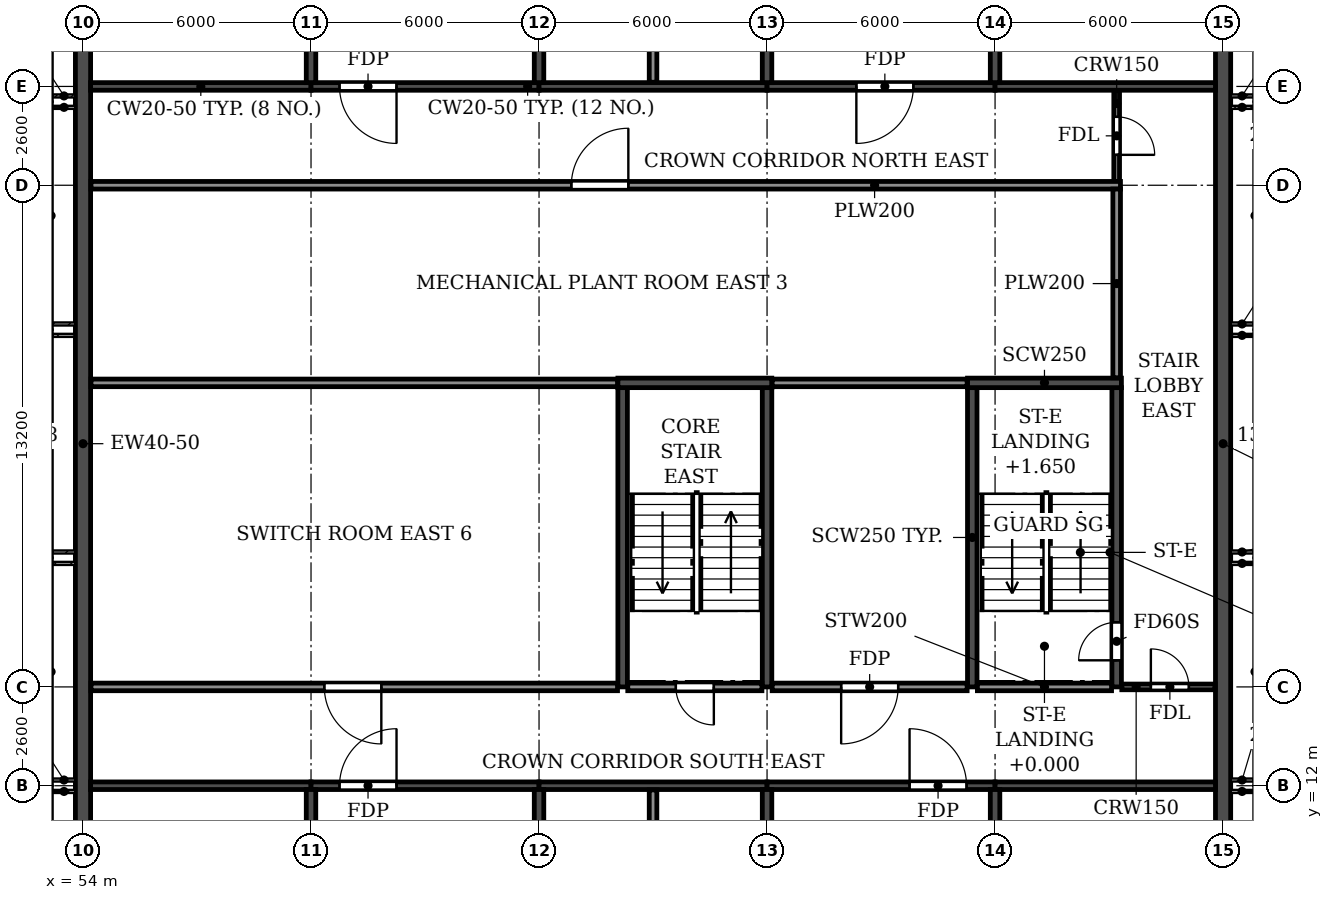
"""IFC4 building model, lengths in metres.
Left out: names, types, materials, properties, quantities, classifications, styles, units other than length and angle.
Written with IfcOpenShell. Run it as: python <this file> out.ifc"""

import sys

from ifc_helpers import new_model, si_unit, direction, frame, frame_2d, origin, place, context, subcontext, project, spatial, rectangle, extrude, element, fill, save


model = new_model("IFC4")
c1 = context("Model", 3, precision=1e-05, world=origin(), true_north=direction((0.0, 1.0)))
c2 = subcontext(c1, "Body", "Model", "MODEL_VIEW")
j1 = project(units=[si_unit("LENGTHUNIT", "METRE"), si_unit("PLANEANGLEUNIT", "RADIAN")], contexts=[c1])
p1 = place(None, origin())
s1 = spatial("IfcSite", under=j1, at=p1, CompositionType="ELEMENT")
p2 = place(p1, origin())
s2 = spatial("IfcBuilding", under=s1, at=p2, CompositionType="ELEMENT")
p3 = place(p2, frame((0.0, 0.0, 279.0)))
s3 = spatial("IfcBuildingStorey", under=s2, at=p3, CompositionType="ELEMENT", Elevation=279.0)
p4 = place(p3, frame((60.0, 0.2, 0.0), z_axis=(0.0, 0.0, 1.0), x_axis=(0.0, 1.0, 0.0)))
e1 = element("IfcWall", 1, at=p4, inside=s3, PredefinedType="SHEAR", context=c2, shape_type="SweptSolid", body=[
    extrude(rectangle(XDim=11.7, YDim=0.25, at=frame_2d((5.85, 0.0))), origin(), (0.0, 0.0, 1.0), 3.05),
])
p5 = place(p3, frame((60.0, 30.5, 0.0), z_axis=(0.0, 0.0, 1.0), x_axis=(0.0, 1.0, 0.0)))
e2 = element("IfcWall", 2, at=p5, inside=s3, PredefinedType="SHEAR", context=c2, shape_type="SweptSolid", body=[
    extrude(rectangle(XDim=10.5, YDim=0.25, at=frame_2d((5.25, 0.0))), origin(), (0.0, 0.0, 1.0), 3.05),
])
p6 = place(p3, frame((66.0, 0.2, 0.0), z_axis=(0.0, 0.0, 1.0), x_axis=(0.0, 1.0, 0.0)))
e3 = element("IfcWall", 3, at=p6, inside=s3, PredefinedType="SHEAR", context=c2, shape_type="SweptSolid", body=[
    extrude(rectangle(XDim=11.7, YDim=0.25, at=frame_2d((5.85, 0.0))), origin(), (0.0, 0.0, 1.0), 3.05),
])
p7 = place(p3, frame((66.0, 30.5, 0.0), z_axis=(0.0, 0.0, 1.0), x_axis=(0.0, 1.0, 0.0)))
e4 = element("IfcWall", 4, at=p7, inside=s3, PredefinedType="SHEAR", context=c2, shape_type="SweptSolid", body=[
    extrude(rectangle(XDim=10.5, YDim=0.25, at=frame_2d((5.25, 0.0))), origin(), (0.0, 0.0, 1.0), 3.05),
])
p8 = place(p3, frame((72.0, 0.2, 0.0), z_axis=(0.0, 0.0, 1.0), x_axis=(0.0, 1.0, 0.0)))
e5 = element("IfcWall", 5, at=p8, inside=s3, PredefinedType="SHEAR", context=c2, shape_type="SweptSolid", body=[
    extrude(rectangle(XDim=11.7, YDim=0.25, at=frame_2d((5.85, 0.0))), origin(), (0.0, 0.0, 1.0), 3.05),
])
p9 = place(p3, frame((72.0, 30.5, 0.0), z_axis=(0.0, 0.0, 1.0), x_axis=(0.0, 1.0, 0.0)))
e6 = element("IfcWall", 6, at=p9, inside=s3, PredefinedType="SHEAR", context=c2, shape_type="SweptSolid", body=[
    extrude(rectangle(XDim=10.5, YDim=0.25, at=frame_2d((5.25, 0.0))), origin(), (0.0, 0.0, 1.0), 3.05),
])
p10 = place(p3, frame((78.0, 0.2, 0.0), z_axis=(0.0, 0.0, 1.0), x_axis=(0.0, 1.0, 0.0)))
e7 = element("IfcWall", 7, at=p10, inside=s3, PredefinedType="SHEAR", context=c2, shape_type="SweptSolid", body=[
    extrude(rectangle(XDim=11.7, YDim=0.25, at=frame_2d((5.85, 0.0))), origin(), (0.0, 0.0, 1.0), 3.05),
])
p11 = place(p3, frame((78.0, 30.5, 0.0), z_axis=(0.0, 0.0, 1.0), x_axis=(0.0, 1.0, 0.0)))
e8 = element("IfcWall", 8, at=p11, inside=s3, PredefinedType="SHEAR", context=c2, shape_type="SweptSolid", body=[
    extrude(rectangle(XDim=10.5, YDim=0.25, at=frame_2d((5.25, 0.0))), origin(), (0.0, 0.0, 1.0), 3.05),
])
p12 = place(p3, frame((54.0, 0.2, 0.0), z_axis=(0.0, 0.0, 1.0), x_axis=(0.0, 1.0, 0.0)))
e9 = element("IfcWall", 9, at=p12, inside=s3, PredefinedType="SHEAR", context=c2, shape_type="SweptSolid", body=[
    extrude(rectangle(XDim=40.8, YDim=0.4, at=frame_2d((20.4, 0.0))), origin(), (0.0, 0.0, 1.0), 3.05),
])
p13 = place(p3, frame((84.0, 4.683, 0.0), z_axis=(0.0, 0.0, 1.0), x_axis=(0.0, 1.0, 0.0)))
e10 = element("IfcWall", 10, at=p13, inside=s3, PredefinedType="SHEAR", context=c2, shape_type="SweptSolid", body=[
    extrude(rectangle(XDim=31.834, YDim=0.4, at=frame_2d((15.917, 0.0))), origin(), (0.0, 0.0, 1.0), 3.05),
])
p14 = place(p3, frame((54.2, 12.0, 0.0), z_axis=(0.0, 0.0, 1.0), x_axis=(1.0, 0.0, 0.0)))
e11 = element("IfcWall", 11, at=p14, inside=s3, PredefinedType="SHEAR", context=c2, shape_type="SweptSolid", body=[
    extrude(rectangle(XDim=5.8, YDim=0.2, at=frame_2d((2.9, 0.0))), origin(), (0.0, 0.0, 1.0), 2.45),
])
p15 = place(p3, frame((60.0, 12.0, 0.0), z_axis=(0.0, 0.0, 1.0), x_axis=(1.0, 0.0, 0.0)))
e12 = element("IfcWall", 12, at=p15, inside=s3, PredefinedType="SHEAR", context=c2, shape_type="SweptSolid", body=[
    extrude(rectangle(XDim=6.0, YDim=0.2, at=frame_2d((3.0, 0.0))), origin(), (0.0, 0.0, 1.0), 2.45),
])
p16 = place(p15, frame((0.75, 0.0, 0.0)))
e13 = element("IfcOpeningElement", 13, at=p16, cuts=e12, PredefinedType="OPENING", context=c2, shape_type="SweptSolid", body=[
    extrude(rectangle(XDim=1.5, YDim=2.1, at=frame_2d((0.75, 1.05))), frame((0.0, 0.11, 0.0), z_axis=(0.0, -1.0, 0.0), x_axis=(1.0, 0.0, 0.0)), (0.0, 0.0, 1.0), 0.22),
])
p17 = place(p3, frame((66.0, 12.0, 0.0), z_axis=(0.0, 0.0, 1.0), x_axis=(1.0, 0.0, 0.0)))
e14 = element("IfcWall", 14, at=p17, inside=s3, PredefinedType="SHEAR", context=c2, shape_type="SweptSolid", body=[
    extrude(rectangle(XDim=6.0, YDim=0.2, at=frame_2d((3.0, 0.0))), origin(), (0.0, 0.0, 1.0), 2.45),
])
p18 = place(p3, frame((72.0, 12.0, 0.0), z_axis=(0.0, 0.0, 1.0), x_axis=(1.0, 0.0, 0.0)))
e15 = element("IfcWall", 15, at=p18, inside=s3, PredefinedType="SHEAR", context=c2, shape_type="SweptSolid", body=[
    extrude(rectangle(XDim=6.0, YDim=0.2, at=frame_2d((3.0, 0.0))), origin(), (0.0, 0.0, 1.0), 2.45),
])
p19 = place(p18, frame((3.75, 0.0, 0.0)))
e16 = element("IfcOpeningElement", 16, at=p19, cuts=e15, PredefinedType="OPENING", context=c2, shape_type="SweptSolid", body=[
    extrude(rectangle(XDim=1.5, YDim=2.1, at=frame_2d((0.75, 1.05))), frame((0.0, 0.11, 0.0), z_axis=(0.0, -1.0, 0.0), x_axis=(1.0, 0.0, 0.0)), (0.0, 0.0, 1.0), 0.22),
])
for number, where, z_axis, x_axis in (
    (17, (78.0, 12.0, 0.0), (0.0, 0.0, 1.0), (1.0, 0.0, 0.0)),
    (18, (54.2, 30.4, 0.0), (0.0, 0.0, 1.0), (1.0, 0.0, 0.0)),
):
    element("IfcWall", number, at=place(p3, frame(where, z_axis=z_axis, x_axis=x_axis)), inside=s3, PredefinedType="SHEAR", context=c2, shape_type="SweptSolid", body=[
        extrude(rectangle(XDim=5.8, YDim=0.2, at=frame_2d((2.9, 0.0))), origin(), (0.0, 0.0, 1.0), 2.45),
    ])
p20 = place(p3, frame((60.0, 30.4, 0.0), z_axis=(0.0, 0.0, 1.0), x_axis=(1.0, 0.0, 0.0)))
e19 = element("IfcWall", 19, at=p20, inside=s3, PredefinedType="SHEAR", context=c2, shape_type="SweptSolid", body=[
    extrude(rectangle(XDim=6.0, YDim=0.2, at=frame_2d((3.0, 0.0))), origin(), (0.0, 0.0, 1.0), 2.45),
])
p21 = place(p20, frame((0.75, 0.0, 0.0)))
e20 = element("IfcOpeningElement", 20, at=p21, cuts=e19, PredefinedType="OPENING", context=c2, shape_type="SweptSolid", body=[
    extrude(rectangle(XDim=1.5, YDim=2.1, at=frame_2d((0.75, 1.05))), frame((0.0, 0.11, 0.0), z_axis=(0.0, -1.0, 0.0), x_axis=(1.0, 0.0, 0.0)), (0.0, 0.0, 1.0), 0.22),
])
p22 = place(p3, frame((66.0, 30.4, 0.0), z_axis=(0.0, 0.0, 1.0), x_axis=(1.0, 0.0, 0.0)))
e21 = element("IfcWall", 21, at=p22, inside=s3, PredefinedType="SHEAR", context=c2, shape_type="SweptSolid", body=[
    extrude(rectangle(XDim=6.0, YDim=0.2, at=frame_2d((3.0, 0.0))), origin(), (0.0, 0.0, 1.0), 2.45),
])
p23 = place(p3, frame((72.0, 30.4, 0.0), z_axis=(0.0, 0.0, 1.0), x_axis=(1.0, 0.0, 0.0)))
e22 = element("IfcWall", 22, at=p23, inside=s3, PredefinedType="SHEAR", context=c2, shape_type="SweptSolid", body=[
    extrude(rectangle(XDim=6.0, YDim=0.2, at=frame_2d((3.0, 0.0))), origin(), (0.0, 0.0, 1.0), 2.45),
])
p24 = place(p23, frame((2.35, 0.0, 0.0)))
e23 = element("IfcOpeningElement", 23, at=p24, cuts=e22, PredefinedType="OPENING", context=c2, shape_type="SweptSolid", body=[
    extrude(rectangle(XDim=1.5, YDim=2.1, at=frame_2d((0.75, 1.05))), frame((0.0, 0.11, 0.0), z_axis=(0.0, -1.0, 0.0), x_axis=(1.0, 0.0, 0.0)), (0.0, 0.0, 1.0), 0.22),
])
p25 = place(p3, frame((78.0, 30.4, 0.0), z_axis=(0.0, 0.0, 1.0), x_axis=(1.0, 0.0, 0.0)))
e24 = element("IfcWall", 24, at=p25, inside=s3, PredefinedType="SHEAR", context=c2, shape_type="SweptSolid", body=[
    extrude(rectangle(XDim=5.8, YDim=0.2, at=frame_2d((2.9, 0.0))), origin(), (0.0, 0.0, 1.0), 2.45),
])
p26 = place(p3, frame((77.4, 14.6, 0.0), z_axis=(0.0, 0.0, 1.0), x_axis=(0.0, 1.0, 0.0)))
e25 = element("IfcWall", 25, at=p26, inside=s3, PredefinedType="SOLIDWALL", context=c2, shape_type="SweptSolid", body=[
    extrude(rectangle(XDim=7.875, YDim=0.25, at=frame_2d((3.938, 0.0))), origin(), (0.0, 0.0, 1.0), 3.05),
])
p27 = place(p3, frame((81.2, 14.6, 0.0), z_axis=(0.0, 0.0, 1.0), x_axis=(0.0, 1.0, 0.0)))
e26 = element("IfcWall", 26, at=p27, inside=s3, PredefinedType="SOLIDWALL", context=c2, shape_type="SweptSolid", body=[
    extrude(rectangle(XDim=7.875, YDim=0.25, at=frame_2d((3.938, 0.0))), origin(), (0.0, 0.0, 1.0), 3.05),
])
p28 = place(p27, frame((0.7, 0.0, 0.0)))
e27 = element("IfcOpeningElement", 27, at=p28, cuts=e26, PredefinedType="OPENING", context=c2, shape_type="SweptSolid", body=[
    extrude(rectangle(XDim=1.0, YDim=2.1, at=frame_2d((0.5, 1.05))), frame((0.0, 0.135, 0.0), z_axis=(0.0, -1.0, 0.0), x_axis=(1.0, 0.0, 0.0)), (0.0, 0.0, 1.0), 0.27),
])
p29 = place(p3, frame((77.275, 22.6, 0.0), z_axis=(0.0, 0.0, 1.0), x_axis=(1.0, 0.0, 0.0)))
e28 = element("IfcWall", 28, at=p29, inside=s3, PredefinedType="SOLIDWALL", context=c2, shape_type="SweptSolid", body=[
    extrude(rectangle(XDim=4.05, YDim=0.25, at=frame_2d((2.025, 0.0))), origin(), (0.0, 0.0, 1.0), 3.05),
])
for number, where, z_axis, x_axis in (
    (29, (68.2, 14.6, 0.0), (0.0, 0.0, 1.0), (0.0, 1.0, 0.0)),
    (30, (72.0, 14.6, 0.0), (0.0, 0.0, 1.0), (0.0, 1.0, 0.0)),
):
    element("IfcWall", number, at=place(p3, frame(where, z_axis=z_axis, x_axis=x_axis)), inside=s3, PredefinedType="SOLIDWALL", context=c2, shape_type="SweptSolid", body=[
        extrude(rectangle(XDim=7.875, YDim=0.25, at=frame_2d((3.938, 0.0))), origin(), (0.0, 0.0, 1.0), 3.05),
    ])
p30 = place(p3, frame((68.075, 22.6, 0.0), z_axis=(0.0, 0.0, 1.0), x_axis=(1.0, 0.0, 0.0)))
e31 = element("IfcWall", 31, at=p30, inside=s3, PredefinedType="SOLIDWALL", context=c2, shape_type="SweptSolid", body=[
    extrude(rectangle(XDim=4.05, YDim=0.25, at=frame_2d((2.025, 0.0))), origin(), (0.0, 0.0, 1.0), 3.05),
])
p31 = place(p3, frame((81.335, 14.6, 0.0), z_axis=(0.0, 0.0, 1.0), x_axis=(1.0, 0.0, 0.0)))
e32 = element("IfcWall", 32, at=p31, inside=s3, PredefinedType="PARTITIONING", context=c2, shape_type="SweptSolid", body=[
    extrude(rectangle(XDim=2.455, YDim=0.15, at=frame_2d((1.228, 0.0))), origin(), (0.0, 0.0, 1.0), 3.05),
])
p32 = place(p31, frame((0.765, 0.0, 0.0)))
e33 = element("IfcOpeningElement", 33, at=p32, cuts=e32, PredefinedType="OPENING", context=c2, shape_type="SweptSolid", body=[
    extrude(rectangle(XDim=1.0, YDim=2.1, at=frame_2d((0.5, 1.05))), frame((0.0, 0.085, 0.0), z_axis=(0.0, -1.0, 0.0), x_axis=(1.0, 0.0, 0.0)), (0.0, 0.0, 1.0), 0.17),
])
p33 = place(p3, frame((81.2, 27.9, 0.0), z_axis=(0.0, 0.0, 1.0), x_axis=(0.0, 1.0, 0.0)))
e34 = element("IfcWall", 34, at=p33, inside=s3, PredefinedType="PARTITIONING", context=c2, shape_type="SweptSolid", body=[
    extrude(rectangle(XDim=2.39, YDim=0.15, at=frame_2d((1.195, 0.0))), origin(), (0.0, 0.0, 1.0), 3.05),
])
p34 = place(p33, frame((0.7, 0.0, 0.0)))
e35 = element("IfcOpeningElement", 35, at=p34, cuts=e34, PredefinedType="OPENING", context=c2, shape_type="SweptSolid", body=[
    extrude(rectangle(XDim=1.0, YDim=2.1, at=frame_2d((0.5, 1.05))), frame((0.0, 0.085, 0.0), z_axis=(0.0, -1.0, 0.0), x_axis=(1.0, 0.0, 0.0)), (0.0, 0.0, 1.0), 0.17),
])
p35 = place(p3, frame((54.21, 14.6, 0.0), z_axis=(0.0, 0.0, 1.0), x_axis=(1.0, 0.0, 0.0)))
e36 = element("IfcWall", 36, at=p35, inside=s3, PredefinedType="PARTITIONING", context=c2, shape_type="SweptSolid", body=[
    extrude(rectangle(XDim=13.855, YDim=0.2, at=frame_2d((6.927, 0.0))), origin(), (0.0, 0.0, 1.0), 3.05),
])
p36 = place(p35, frame((6.14, 0.0, 0.0)))
e37 = element("IfcOpeningElement", 37, at=p36, cuts=e36, PredefinedType="OPENING", context=c2, shape_type="SweptSolid", body=[
    extrude(rectangle(XDim=1.5, YDim=2.1, at=frame_2d((0.75, 1.05))), frame((0.0, 0.11, 0.0), z_axis=(0.0, -1.0, 0.0), x_axis=(1.0, 0.0, 0.0)), (0.0, 0.0, 1.0), 0.22),
])
p37 = place(p3, frame((72.135, 14.6, 0.0), z_axis=(0.0, 0.0, 1.0), x_axis=(1.0, 0.0, 0.0)))
e38 = element("IfcWall", 38, at=p37, inside=s3, PredefinedType="PARTITIONING", context=c2, shape_type="SweptSolid", body=[
    extrude(rectangle(XDim=5.13, YDim=0.2, at=frame_2d((2.565, 0.0))), origin(), (0.0, 0.0, 1.0), 3.05),
])
p38 = place(p37, frame((1.815, 0.0, 0.0)))
e39 = element("IfcOpeningElement", 39, at=p38, cuts=e38, PredefinedType="OPENING", context=c2, shape_type="SweptSolid", body=[
    extrude(rectangle(XDim=1.5, YDim=2.1, at=frame_2d((0.75, 1.05))), frame((0.0, 0.11, 0.0), z_axis=(0.0, -1.0, 0.0), x_axis=(1.0, 0.0, 0.0)), (0.0, 0.0, 1.0), 0.22),
])
p39 = place(p3, frame((54.21, 22.6, 0.0), z_axis=(0.0, 0.0, 1.0), x_axis=(1.0, 0.0, 0.0)))
e40 = element("IfcWall", 40, at=p39, inside=s3, PredefinedType="PARTITIONING", context=c2, shape_type="SweptSolid", body=[
    extrude(rectangle(XDim=13.855, YDim=0.2, at=frame_2d((6.927, 0.0))), origin(), (0.0, 0.0, 1.0), 3.05),
])
p40 = place(p3, frame((72.135, 22.6, 0.0), z_axis=(0.0, 0.0, 1.0), x_axis=(1.0, 0.0, 0.0)))
e41 = element("IfcWall", 41, at=p40, inside=s3, PredefinedType="PARTITIONING", context=c2, shape_type="SweptSolid", body=[
    extrude(rectangle(XDim=5.13, YDim=0.2, at=frame_2d((2.565, 0.0))), origin(), (0.0, 0.0, 1.0), 3.05),
])
p41 = place(p3, frame((54.21, 27.8, 0.0), z_axis=(0.0, 0.0, 1.0), x_axis=(1.0, 0.0, 0.0)))
e42 = element("IfcWall", 42, at=p41, inside=s3, PredefinedType="PARTITIONING", context=c2, shape_type="SweptSolid", body=[
    extrude(rectangle(XDim=27.09, YDim=0.2, at=frame_2d((13.545, 0.0))), origin(), (0.0, 0.0, 1.0), 3.05),
])
p42 = place(p41, frame((12.64, 0.0, 0.0)))
e43 = element("IfcOpeningElement", 43, at=p42, cuts=e42, PredefinedType="OPENING", context=c2, shape_type="SweptSolid", body=[
    extrude(rectangle(XDim=1.5, YDim=2.1, at=frame_2d((0.75, 1.05))), frame((0.0, 0.11, 0.0), z_axis=(0.0, -1.0, 0.0), x_axis=(1.0, 0.0, 0.0)), (0.0, 0.0, 1.0), 0.22),
])
p43 = place(p3, frame((69.0, 0.06, 0.0), z_axis=(0.0, 0.0, 1.0), x_axis=(0.0, 1.0, 0.0)))
e44 = element("IfcWall", 44, at=p43, inside=s3, PredefinedType="PARTITIONING", context=c2, shape_type="SweptSolid", body=[
    extrude(rectangle(XDim=11.83, YDim=0.2, at=frame_2d((5.915, 0.0))), origin(), (0.0, 0.0, 1.0), 3.05),
])
p44 = place(p3, frame((69.0, 30.51, 0.0), z_axis=(0.0, 0.0, 1.0), x_axis=(0.0, 1.0, 0.0)))
e45 = element("IfcWall", 45, at=p44, inside=s3, PredefinedType="PARTITIONING", context=c2, shape_type="SweptSolid", body=[
    extrude(rectangle(XDim=10.63, YDim=0.2, at=frame_2d((5.315, 0.0))), origin(), (0.0, 0.0, 1.0), 3.05),
])
p45 = place(p3, frame((81.2, 22.735, 0.0), z_axis=(0.0, 0.0, 1.0), x_axis=(0.0, 1.0, 0.0)))
e46 = element("IfcWall", 46, at=p45, inside=s3, PredefinedType="PARTITIONING", context=c2, shape_type="SweptSolid", body=[
    extrude(rectangle(XDim=4.965, YDim=0.2, at=frame_2d((2.482, 0.0))), origin(), (0.0, 0.0, 1.0), 3.05),
])
p46 = place(p3, frame((68.335, 14.6, 0.0), z_axis=(0.0, 0.0, 1.0), x_axis=(1.0, 0.0, 0.0)))
e47 = element("IfcWall", 47, at=p46, inside=s3, PredefinedType="PARTITIONING", context=c2, shape_type="SweptSolid", body=[
    extrude(rectangle(XDim=3.53, YDim=0.2, at=frame_2d((1.765, 0.0))), origin(), (0.0, 0.0, 1.0), 3.05),
])
p47 = place(p46, frame((1.265, 0.0, 0.0)))
e48 = element("IfcOpeningElement", 48, at=p47, cuts=e47, PredefinedType="OPENING", context=c2, shape_type="SweptSolid", body=[
    extrude(rectangle(XDim=1.0, YDim=2.1, at=frame_2d((0.5, 1.05))), frame((0.0, 0.11, 0.0), z_axis=(0.0, -1.0, 0.0), x_axis=(1.0, 0.0, 0.0)), (0.0, 0.0, 1.0), 0.22),
])
p48 = place(p3, frame((77.535, 14.6, 0.0), z_axis=(0.0, 0.0, 1.0), x_axis=(1.0, 0.0, 0.0)))
e49 = element("IfcWall", 49, at=p48, inside=s3, PredefinedType="PARTITIONING", context=c2, shape_type="SweptSolid", body=[
    extrude(rectangle(XDim=3.53, YDim=0.2, at=frame_2d((1.765, 0.0))), origin(), (0.0, 0.0, 1.0), 3.05),
])
p49 = place(p21, frame((1.5, 0.0, 0.0), z_axis=(0.0, 0.0, 1.0), x_axis=(-1.0, 0.0, 0.0)))
e50 = element("IfcDoor", 50, at=p49, inside=s3, OperationType="DOUBLE_DOOR_SINGLE_SWING", PredefinedType="DOOR", context=c2, shape_type="SweptSolid", body=[
    extrude(rectangle(XDim=1.5, YDim=2.1, at=frame_2d((0.75, 1.05))), frame((0.0, 0.025, 0.0), z_axis=(0.0, -1.0, 0.0), x_axis=(1.0, 0.0, 0.0)), (0.0, 0.0, 1.0), 0.05),
])
fill(e20, e50)
p50 = place(p42, origin())
e51 = element("IfcDoor", 51, at=p50, inside=s3, OperationType="DOUBLE_DOOR_SINGLE_SWING", PredefinedType="DOOR", context=c2, shape_type="SweptSolid", body=[
    extrude(rectangle(XDim=1.5, YDim=2.1, at=frame_2d((0.75, 1.05))), frame((0.0, 0.025, 0.0), z_axis=(0.0, -1.0, 0.0), x_axis=(1.0, 0.0, 0.0)), (0.0, 0.0, 1.0), 0.05),
])
fill(e43, e51)
p51 = place(p24, frame((1.5, 0.0, 0.0), z_axis=(0.0, 0.0, 1.0), x_axis=(-1.0, 0.0, 0.0)))
e52 = element("IfcDoor", 52, at=p51, inside=s3, OperationType="DOUBLE_DOOR_SINGLE_SWING", PredefinedType="DOOR", context=c2, shape_type="SweptSolid", body=[
    extrude(rectangle(XDim=1.5, YDim=2.1, at=frame_2d((0.75, 1.05))), frame((0.0, 0.025, 0.0), z_axis=(0.0, -1.0, 0.0), x_axis=(1.0, 0.0, 0.0)), (0.0, 0.0, 1.0), 0.05),
])
fill(e23, e52)
p52 = place(p36, frame((1.5, 0.0, 0.0), z_axis=(0.0, 0.0, 1.0), x_axis=(-1.0, 0.0, 0.0)))
e53 = element("IfcDoor", 53, at=p52, inside=s3, OperationType="DOUBLE_DOOR_SINGLE_SWING", PredefinedType="DOOR", context=c2, shape_type="SweptSolid", body=[
    extrude(rectangle(XDim=1.5, YDim=2.1, at=frame_2d((0.75, 1.05))), frame((0.0, 0.025, 0.0), z_axis=(0.0, -1.0, 0.0), x_axis=(1.0, 0.0, 0.0)), (0.0, 0.0, 1.0), 0.05),
])
fill(e37, e53)
p53 = place(p16, origin())
e54 = element("IfcDoor", 54, at=p53, inside=s3, OperationType="DOUBLE_DOOR_SINGLE_SWING", PredefinedType="DOOR", context=c2, shape_type="SweptSolid", body=[
    extrude(rectangle(XDim=1.5, YDim=2.1, at=frame_2d((0.75, 1.05))), frame((0.0, 0.025, 0.0), z_axis=(0.0, -1.0, 0.0), x_axis=(1.0, 0.0, 0.0)), (0.0, 0.0, 1.0), 0.05),
])
fill(e13, e54)
p54 = place(p38, frame((1.5, 0.0, 0.0), z_axis=(0.0, 0.0, 1.0), x_axis=(-1.0, 0.0, 0.0)))
e55 = element("IfcDoor", 55, at=p54, inside=s3, OperationType="DOUBLE_DOOR_SINGLE_SWING", PredefinedType="DOOR", context=c2, shape_type="SweptSolid", body=[
    extrude(rectangle(XDim=1.5, YDim=2.1, at=frame_2d((0.75, 1.05))), frame((0.0, 0.025, 0.0), z_axis=(0.0, -1.0, 0.0), x_axis=(1.0, 0.0, 0.0)), (0.0, 0.0, 1.0), 0.05),
])
fill(e39, e55)
p55 = place(p19, origin())
e56 = element("IfcDoor", 56, at=p55, inside=s3, OperationType="DOUBLE_DOOR_SINGLE_SWING", PredefinedType="DOOR", context=c2, shape_type="SweptSolid", body=[
    extrude(rectangle(XDim=1.5, YDim=2.1, at=frame_2d((0.75, 1.05))), frame((0.0, 0.025, 0.0), z_axis=(0.0, -1.0, 0.0), x_axis=(1.0, 0.0, 0.0)), (0.0, 0.0, 1.0), 0.05),
])
fill(e16, e56)
p56 = place(p28, origin())
e57 = element("IfcDoor", 57, at=p56, inside=s3, OperationType="SINGLE_SWING_LEFT", PredefinedType="DOOR", context=c2, shape_type="SweptSolid", body=[
    extrude(rectangle(XDim=1.0, YDim=2.1, at=frame_2d((0.5, 1.05))), frame((0.0, 0.025, 0.0), z_axis=(0.0, -1.0, 0.0), x_axis=(1.0, 0.0, 0.0)), (0.0, 0.0, 1.0), 0.05),
])
fill(e27, e57)
p57 = place(p34, frame((1.0, 0.0, 0.0), z_axis=(0.0, 0.0, 1.0), x_axis=(-1.0, 0.0, 0.0)))
e58 = element("IfcDoor", 58, at=p57, inside=s3, OperationType="SINGLE_SWING_RIGHT", PredefinedType="DOOR", context=c2, shape_type="SweptSolid", body=[
    extrude(rectangle(XDim=1.0, YDim=2.1, at=frame_2d((0.5, 1.05))), frame((0.0, 0.025, 0.0), z_axis=(0.0, -1.0, 0.0), x_axis=(1.0, 0.0, 0.0)), (0.0, 0.0, 1.0), 0.05),
])
fill(e35, e58)
p58 = place(p32, origin())
e59 = element("IfcDoor", 59, at=p58, inside=s3, OperationType="SINGLE_SWING_LEFT", PredefinedType="DOOR", context=c2, shape_type="SweptSolid", body=[
    extrude(rectangle(XDim=1.0, YDim=2.1, at=frame_2d((0.5, 1.05))), frame((0.0, 0.025, 0.0), z_axis=(0.0, -1.0, 0.0), x_axis=(1.0, 0.0, 0.0)), (0.0, 0.0, 1.0), 0.05),
])
fill(e33, e59)
p59 = place(p47, frame((1.0, 0.0, 0.0), z_axis=(0.0, 0.0, 1.0), x_axis=(-1.0, 0.0, 0.0)))
e60 = element("IfcDoor", 60, at=p59, inside=s3, OperationType="SINGLE_SWING_LEFT", PredefinedType="DOOR", context=c2, shape_type="SweptSolid", body=[
    extrude(rectangle(XDim=1.0, YDim=2.1, at=frame_2d((0.5, 1.05))), frame((0.0, 0.025, 0.0), z_axis=(0.0, -1.0, 0.0), x_axis=(1.0, 0.0, 0.0)), (0.0, 0.0, 1.0), 0.05),
])
fill(e48, e60)
save(model, sys.argv[1])
